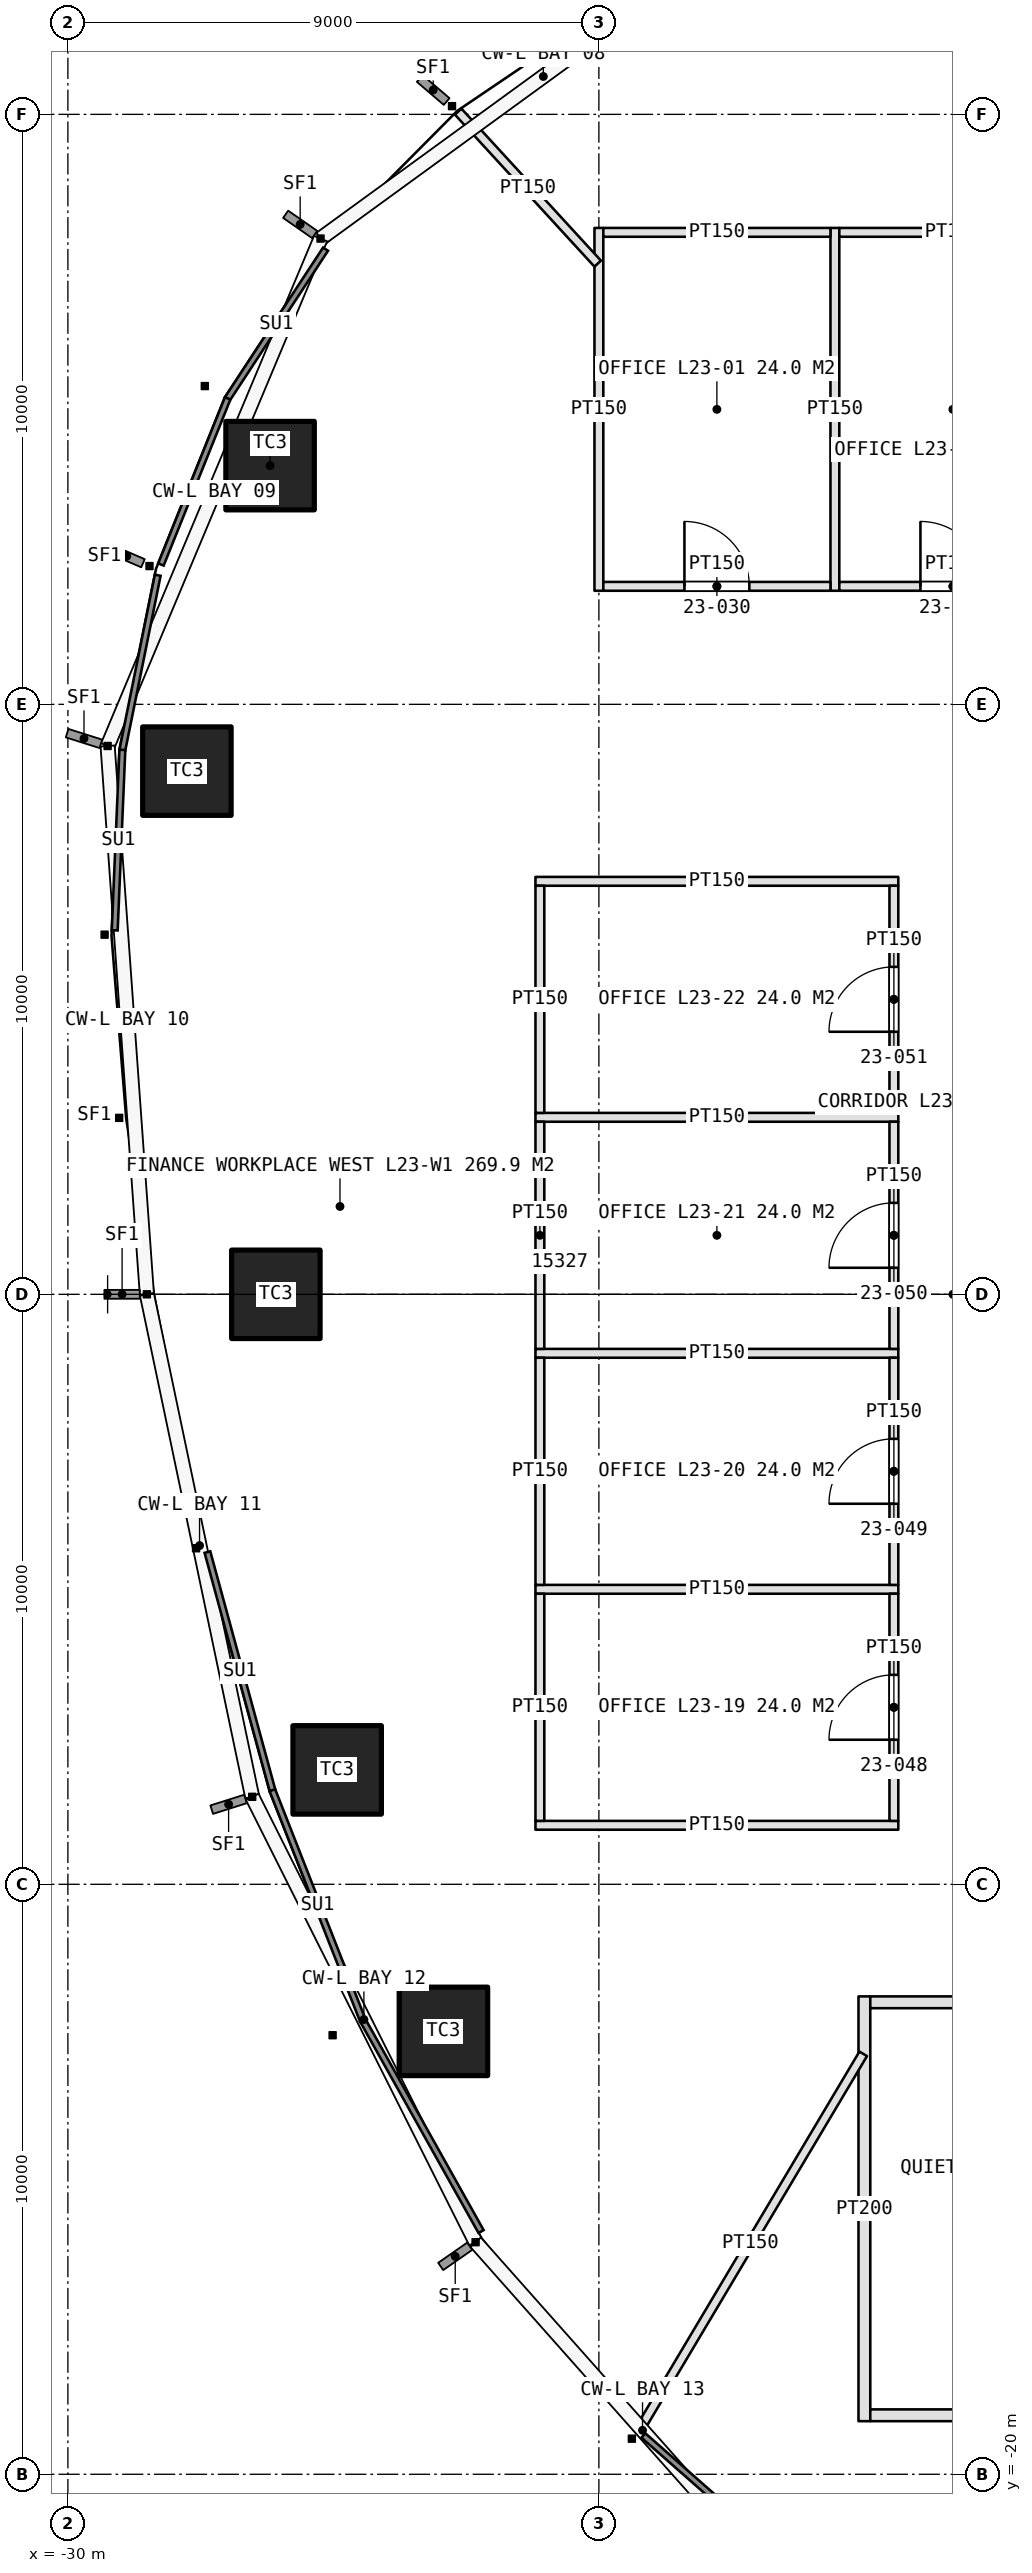
"""IFC4 building model, lengths in metres.
Left out: names, types, materials, properties, quantities, classifications, styles, units other than length and angle.
Written with IfcOpenShell. Run it as: python <this file> out.ifc"""

import sys

from ifc_helpers import new_model, si_unit, direction, frame, frame_2d, origin, origin_2d, place, context, subcontext, project, spatial, rectangle, extrude, element, fill, save


model = new_model("IFC4")
c1 = context("Model", 3, precision=1e-05, world=origin(), true_north=direction((0.0, 1.0)))
c2 = subcontext(c1, "Body", "Model", "MODEL_VIEW")
j1 = project(units=[si_unit("LENGTHUNIT", "METRE"), si_unit("PLANEANGLEUNIT", "RADIAN")], contexts=[c1])
p1 = place(None, origin())
s1 = spatial("IfcSite", under=j1, at=p1, CompositionType="ELEMENT")
p2 = place(p1, origin())
s2 = spatial("IfcBuilding", under=s1, at=p2, CompositionType="ELEMENT")
p3 = place(p2, frame((0.0, 0.0, 113.4)))
s3 = spatial("IfcBuildingStorey", under=s2, at=p3, CompositionType="ELEMENT", Elevation=113.4)
for number, where, z_axis, x_axis in (
    (1, (-26.573, 14.046, 0.0), (0.0, 0.0, 1.0), (1.0, 0.0, 0.0)),
    (2, (-27.983, 8.868, 0.0), (0.0, 0.0, 1.0), (1.0, 0.0, 0.0)),
    (3, (-26.475, 0.0, 0.0), (0.0, 0.0, 1.0), (1.0, 0.0, 0.0)),
    (4, (-25.436, -8.061, 0.0), (0.0, 0.0, 1.0), (1.0, 0.0, 0.0)),
    (5, (-23.635, -12.493, 0.0), (0.0, 0.0, 1.0), (1.0, 0.0, 0.0)),
):
    element("IfcColumn", number, at=place(p3, frame(where, z_axis=z_axis, x_axis=x_axis)), inside=s3, PredefinedType="COLUMN", context=c2, shape_type="SweptSolid", body=[
        extrude(rectangle(XDim=1.5, YDim=1.5, at=origin_2d()), origin(), (0.0, 0.0, 1.0), 4.2),
    ])
for number, where, z_axis, x_axis in (
    (6, (-21.0, 11.925, 0.0), (0.0, 0.0, 1.0), (0.0, 1.0, 0.0)),
    (7, (-17.0, 11.925, 0.0), (0.0, 0.0, 1.0), (0.0, 1.0, 0.0)),
):
    element("IfcWall", number, at=place(p3, frame(where, z_axis=z_axis, x_axis=x_axis)), inside=s3, PredefinedType="PARTITIONING", context=c2, shape_type="SweptSolid", body=[
        extrude(rectangle(XDim=6.15, YDim=0.15, at=frame_2d((3.075, 0.0))), origin(), (0.0, 0.0, 1.0), 3.0),
    ])
p4 = place(p3, frame((-20.925, 12.0, 0.0), z_axis=(0.0, 0.0, 1.0), x_axis=(1.0, 0.0, 0.0)))
e8 = element("IfcWall", 8, at=p4, inside=s3, PredefinedType="PARTITIONING", context=c2, shape_type="SweptSolid", body=[
    extrude(rectangle(XDim=3.85, YDim=0.15, at=frame_2d((1.925, 0.0))), origin(), (0.0, 0.0, 1.0), 3.0),
])
p5 = place(p4, frame((1.375, 0.0, 0.0)))
e9 = element("IfcOpeningElement", 9, at=p5, cuts=e8, PredefinedType="OPENING", context=c2, shape_type="SweptSolid", body=[
    extrude(rectangle(XDim=1.1, YDim=2.3, at=frame_2d((0.55, 1.15))), frame((0.0, 0.085, 0.0), z_axis=(0.0, -1.0, 0.0), x_axis=(1.0, 0.0, 0.0)), (0.0, 0.0, 1.0), 0.17),
])
p6 = place(p3, frame((-20.925, 18.0, 0.0), z_axis=(0.0, 0.0, 1.0), x_axis=(1.0, 0.0, 0.0)))
e10 = element("IfcWall", 10, at=p6, inside=s3, PredefinedType="PARTITIONING", context=c2, shape_type="SweptSolid", body=[
    extrude(rectangle(XDim=3.85, YDim=0.15, at=frame_2d((1.925, 0.0))), origin(), (0.0, 0.0, 1.0), 3.0),
])
p7 = place(p3, frame((-16.925, 12.0, 0.0), z_axis=(0.0, 0.0, 1.0), x_axis=(1.0, 0.0, 0.0)))
e11 = element("IfcWall", 11, at=p7, inside=s3, PredefinedType="PARTITIONING", context=c2, shape_type="SweptSolid", body=[
    extrude(rectangle(XDim=3.85, YDim=0.15, at=frame_2d((1.925, 0.0))), origin(), (0.0, 0.0, 1.0), 3.0),
])
p8 = place(p7, frame((1.375, 0.0, 0.0)))
e12 = element("IfcOpeningElement", 12, at=p8, cuts=e11, PredefinedType="OPENING", context=c2, shape_type="SweptSolid", body=[
    extrude(rectangle(XDim=1.1, YDim=2.3, at=frame_2d((0.55, 1.15))), frame((0.0, 0.085, 0.0), z_axis=(0.0, -1.0, 0.0), x_axis=(1.0, 0.0, 0.0)), (0.0, 0.0, 1.0), 0.17),
])
p9 = place(p3, frame((-16.925, 18.0, 0.0), z_axis=(0.0, 0.0, 1.0), x_axis=(1.0, 0.0, 0.0)))
e13 = element("IfcWall", 13, at=p9, inside=s3, PredefinedType="PARTITIONING", context=c2, shape_type="SweptSolid", body=[
    extrude(rectangle(XDim=3.85, YDim=0.15, at=frame_2d((1.925, 0.0))), origin(), (0.0, 0.0, 1.0), 3.0),
])
p10 = place(p3, frame((-16.5, -11.9, 0.0), z_axis=(0.0, 0.0, 1.0), x_axis=(0.0, -1.0, 0.0)))
e14 = element("IfcWall", 14, at=p10, inside=s3, PredefinedType="PARTITIONING", context=c2, shape_type="SweptSolid", body=[
    extrude(rectangle(XDim=7.2, YDim=0.2, at=frame_2d((3.6, 0.0))), origin(), (0.0, 0.0, 1.0), 3.0),
])
p11 = place(p3, frame((-16.4, -12.0, 0.0), z_axis=(0.0, 0.0, 1.0), x_axis=(1.0, 0.0, 0.0)))
e15 = element("IfcWall", 15, at=p11, inside=s3, PredefinedType="PARTITIONING", context=c2, shape_type="SweptSolid", body=[
    extrude(rectangle(XDim=5.8, YDim=0.2, at=frame_2d((2.9, 0.0))), origin(), (0.0, 0.0, 1.0), 3.0),
])
p12 = place(p11, frame((2.35, 0.0, 0.0)))
e16 = element("IfcOpeningElement", 16, at=p12, cuts=e15, PredefinedType="OPENING", context=c2, shape_type="SweptSolid", body=[
    extrude(rectangle(XDim=1.1, YDim=2.3, at=frame_2d((0.55, 1.15))), frame((0.0, 0.11, 0.0), z_axis=(0.0, -1.0, 0.0), x_axis=(1.0, 0.0, 0.0)), (0.0, 0.0, 1.0), 0.22),
])
p13 = place(p3, frame((-16.4, -19.0, 0.0), z_axis=(0.0, 0.0, 1.0), x_axis=(1.0, 0.0, 0.0)))
e17 = element("IfcWall", 17, at=p13, inside=s3, PredefinedType="PARTITIONING", context=c2, shape_type="SweptSolid", body=[
    extrude(rectangle(XDim=5.8, YDim=0.2, at=frame_2d((2.9, 0.0))), origin(), (0.0, 0.0, 1.0), 3.0),
])
for number, where, z_axis, x_axis in (
    (18, (-15.925, -9.0, 0.0), (0.0, 0.0, 1.0), (-1.0, 0.0, 0.0)),
    (19, (-15.925, -5.0, 0.0), (0.0, 0.0, 1.0), (-1.0, 0.0, 0.0)),
    (20, (-15.925, -1.0, 0.0), (0.0, 0.0, 1.0), (-1.0, 0.0, 0.0)),
    (21, (-15.925, 3.0, 0.0), (0.0, 0.0, 1.0), (-1.0, 0.0, 0.0)),
    (22, (-15.925, 7.0, 0.0), (0.0, 0.0, 1.0), (-1.0, 0.0, 0.0)),
):
    element("IfcWall", number, at=place(p3, frame(where, z_axis=z_axis, x_axis=x_axis)), inside=s3, PredefinedType="PARTITIONING", context=c2, shape_type="SweptSolid", body=[
        extrude(rectangle(XDim=6.15, YDim=0.15, at=frame_2d((3.075, 0.0))), origin(), (0.0, 0.0, 1.0), 3.0),
    ])
p14 = place(p3, frame((-16.0, -8.925, 0.0), z_axis=(0.0, 0.0, 1.0), x_axis=(0.0, 1.0, 0.0)))
e23 = element("IfcWall", 23, at=p14, inside=s3, PredefinedType="PARTITIONING", context=c2, shape_type="SweptSolid", body=[
    extrude(rectangle(XDim=3.85, YDim=0.15, at=frame_2d((1.925, 0.0))), origin(), (0.0, 0.0, 1.0), 3.0),
])
p15 = place(p14, frame((1.375, 0.0, 0.0)))
e24 = element("IfcOpeningElement", 24, at=p15, cuts=e23, PredefinedType="OPENING", context=c2, shape_type="SweptSolid", body=[
    extrude(rectangle(XDim=1.1, YDim=2.3, at=frame_2d((0.55, 1.15))), frame((0.0, 0.085, 0.0), z_axis=(0.0, -1.0, 0.0), x_axis=(1.0, 0.0, 0.0)), (0.0, 0.0, 1.0), 0.17),
])
p16 = place(p3, frame((-22.0, -8.925, 0.0), z_axis=(0.0, 0.0, 1.0), x_axis=(0.0, 1.0, 0.0)))
e25 = element("IfcWall", 25, at=p16, inside=s3, PredefinedType="PARTITIONING", context=c2, shape_type="SweptSolid", body=[
    extrude(rectangle(XDim=3.85, YDim=0.15, at=frame_2d((1.925, 0.0))), origin(), (0.0, 0.0, 1.0), 3.0),
])
p17 = place(p3, frame((-16.0, -4.925, 0.0), z_axis=(0.0, 0.0, 1.0), x_axis=(0.0, 1.0, 0.0)))
e26 = element("IfcWall", 26, at=p17, inside=s3, PredefinedType="PARTITIONING", context=c2, shape_type="SweptSolid", body=[
    extrude(rectangle(XDim=3.85, YDim=0.15, at=frame_2d((1.925, 0.0))), origin(), (0.0, 0.0, 1.0), 3.0),
])
p18 = place(p17, frame((1.375, 0.0, 0.0)))
e27 = element("IfcOpeningElement", 27, at=p18, cuts=e26, PredefinedType="OPENING", context=c2, shape_type="SweptSolid", body=[
    extrude(rectangle(XDim=1.1, YDim=2.3, at=frame_2d((0.55, 1.15))), frame((0.0, 0.085, 0.0), z_axis=(0.0, -1.0, 0.0), x_axis=(1.0, 0.0, 0.0)), (0.0, 0.0, 1.0), 0.17),
])
p19 = place(p3, frame((-22.0, -4.925, 0.0), z_axis=(0.0, 0.0, 1.0), x_axis=(0.0, 1.0, 0.0)))
e28 = element("IfcWall", 28, at=p19, inside=s3, PredefinedType="PARTITIONING", context=c2, shape_type="SweptSolid", body=[
    extrude(rectangle(XDim=3.85, YDim=0.15, at=frame_2d((1.925, 0.0))), origin(), (0.0, 0.0, 1.0), 3.0),
])
p20 = place(p3, frame((-16.0, -0.925, 0.0), z_axis=(0.0, 0.0, 1.0), x_axis=(0.0, 1.0, 0.0)))
e29 = element("IfcWall", 29, at=p20, inside=s3, PredefinedType="PARTITIONING", context=c2, shape_type="SweptSolid", body=[
    extrude(rectangle(XDim=3.85, YDim=0.15, at=frame_2d((1.925, 0.0))), origin(), (0.0, 0.0, 1.0), 3.0),
])
p21 = place(p20, frame((1.375, 0.0, 0.0)))
e30 = element("IfcOpeningElement", 30, at=p21, cuts=e29, PredefinedType="OPENING", context=c2, shape_type="SweptSolid", body=[
    extrude(rectangle(XDim=1.1, YDim=2.3, at=frame_2d((0.55, 1.15))), frame((0.0, 0.085, 0.0), z_axis=(0.0, -1.0, 0.0), x_axis=(1.0, 0.0, 0.0)), (0.0, 0.0, 1.0), 0.17),
])
p22 = place(p3, frame((-22.0, -0.925, 0.0), z_axis=(0.0, 0.0, 1.0), x_axis=(0.0, 1.0, 0.0)))
e31 = element("IfcWall", 31, at=p22, inside=s3, PredefinedType="PARTITIONING", context=c2, shape_type="SweptSolid", body=[
    extrude(rectangle(XDim=3.85, YDim=0.15, at=frame_2d((1.925, 0.0))), origin(), (0.0, 0.0, 1.0), 3.0),
])
p23 = place(p3, frame((-16.0, 3.075, 0.0), z_axis=(0.0, 0.0, 1.0), x_axis=(0.0, 1.0, 0.0)))
e32 = element("IfcWall", 32, at=p23, inside=s3, PredefinedType="PARTITIONING", context=c2, shape_type="SweptSolid", body=[
    extrude(rectangle(XDim=3.85, YDim=0.15, at=frame_2d((1.925, 0.0))), origin(), (0.0, 0.0, 1.0), 3.0),
])
p24 = place(p23, frame((1.375, 0.0, 0.0)))
e33 = element("IfcOpeningElement", 33, at=p24, cuts=e32, PredefinedType="OPENING", context=c2, shape_type="SweptSolid", body=[
    extrude(rectangle(XDim=1.1, YDim=2.3, at=frame_2d((0.55, 1.15))), frame((0.0, 0.085, 0.0), z_axis=(0.0, -1.0, 0.0), x_axis=(1.0, 0.0, 0.0)), (0.0, 0.0, 1.0), 0.17),
])
p25 = place(p3, frame((-22.0, 3.075, 0.0), z_axis=(0.0, 0.0, 1.0), x_axis=(0.0, 1.0, 0.0)))
e34 = element("IfcWall", 34, at=p25, inside=s3, PredefinedType="PARTITIONING", context=c2, shape_type="SweptSolid", body=[
    extrude(rectangle(XDim=3.85, YDim=0.15, at=frame_2d((1.925, 0.0))), origin(), (0.0, 0.0, 1.0), 3.0),
])
p26 = place(p3, frame((-16.52, -12.874, 0.0), z_axis=(0.0, 0.0, 1.0), x_axis=(-0.511514296511, -0.85927476657, 0.0)))
e35 = element("IfcWall", 35, at=p26, inside=s3, PredefinedType="PARTITIONING", context=c2, shape_type="SweptSolid", body=[
    extrude(rectangle(XDim=7.474, YDim=0.15, at=frame_2d((3.737, 0.0))), origin(), (0.0, 0.0, 1.0), 3.0),
])
p27 = place(p3, frame((-21.02, 17.47, 0.0), z_axis=(0.0, 0.0, 1.0), x_axis=(-0.67615762792, 0.736756989927, 0.0)))
e36 = element("IfcWall", 36, at=p27, inside=s3, PredefinedType="PARTITIONING", context=c2, shape_type="SweptSolid", body=[
    extrude(rectangle(XDim=3.497, YDim=0.15, at=frame_2d((1.749, 0.0))), origin(), (0.0, 0.0, 1.0), 3.0),
])
p28 = place(p5, origin())
e37 = element("IfcDoor", 37, at=p28, inside=s3, OperationType="SINGLE_SWING_LEFT", PredefinedType="DOOR", context=c2, shape_type="SweptSolid", body=[
    extrude(rectangle(XDim=1.1, YDim=2.3, at=frame_2d((0.55, 1.15))), frame((0.0, 0.025, 0.0), z_axis=(0.0, -1.0, 0.0), x_axis=(1.0, 0.0, 0.0)), (0.0, 0.0, 1.0), 0.05),
])
fill(e9, e37)
p29 = place(p8, origin())
e38 = element("IfcDoor", 38, at=p29, inside=s3, OperationType="SINGLE_SWING_LEFT", PredefinedType="DOOR", context=c2, shape_type="SweptSolid", body=[
    extrude(rectangle(XDim=1.1, YDim=2.3, at=frame_2d((0.55, 1.15))), frame((0.0, 0.025, 0.0), z_axis=(0.0, -1.0, 0.0), x_axis=(1.0, 0.0, 0.0)), (0.0, 0.0, 1.0), 0.05),
])
fill(e12, e38)
p30 = place(p15, origin())
e39 = element("IfcDoor", 39, at=p30, inside=s3, OperationType="SINGLE_SWING_LEFT", PredefinedType="DOOR", context=c2, shape_type="SweptSolid", body=[
    extrude(rectangle(XDim=1.1, YDim=2.3, at=frame_2d((0.55, 1.15))), frame((0.0, 0.025, 0.0), z_axis=(0.0, -1.0, 0.0), x_axis=(1.0, 0.0, 0.0)), (0.0, 0.0, 1.0), 0.05),
])
fill(e24, e39)
p31 = place(p18, origin())
e40 = element("IfcDoor", 40, at=p31, inside=s3, OperationType="SINGLE_SWING_LEFT", PredefinedType="DOOR", context=c2, shape_type="SweptSolid", body=[
    extrude(rectangle(XDim=1.1, YDim=2.3, at=frame_2d((0.55, 1.15))), frame((0.0, 0.025, 0.0), z_axis=(0.0, -1.0, 0.0), x_axis=(1.0, 0.0, 0.0)), (0.0, 0.0, 1.0), 0.05),
])
fill(e27, e40)
p32 = place(p21, origin())
e41 = element("IfcDoor", 41, at=p32, inside=s3, OperationType="SINGLE_SWING_LEFT", PredefinedType="DOOR", context=c2, shape_type="SweptSolid", body=[
    extrude(rectangle(XDim=1.1, YDim=2.3, at=frame_2d((0.55, 1.15))), frame((0.0, 0.025, 0.0), z_axis=(0.0, -1.0, 0.0), x_axis=(1.0, 0.0, 0.0)), (0.0, 0.0, 1.0), 0.05),
])
fill(e30, e41)
p33 = place(p24, origin())
e42 = element("IfcDoor", 42, at=p33, inside=s3, OperationType="SINGLE_SWING_LEFT", PredefinedType="DOOR", context=c2, shape_type="SweptSolid", body=[
    extrude(rectangle(XDim=1.1, YDim=2.3, at=frame_2d((0.55, 1.15))), frame((0.0, 0.025, 0.0), z_axis=(0.0, -1.0, 0.0), x_axis=(1.0, 0.0, 0.0)), (0.0, 0.0, 1.0), 0.05),
])
fill(e33, e42)
save(model, sys.argv[1])
